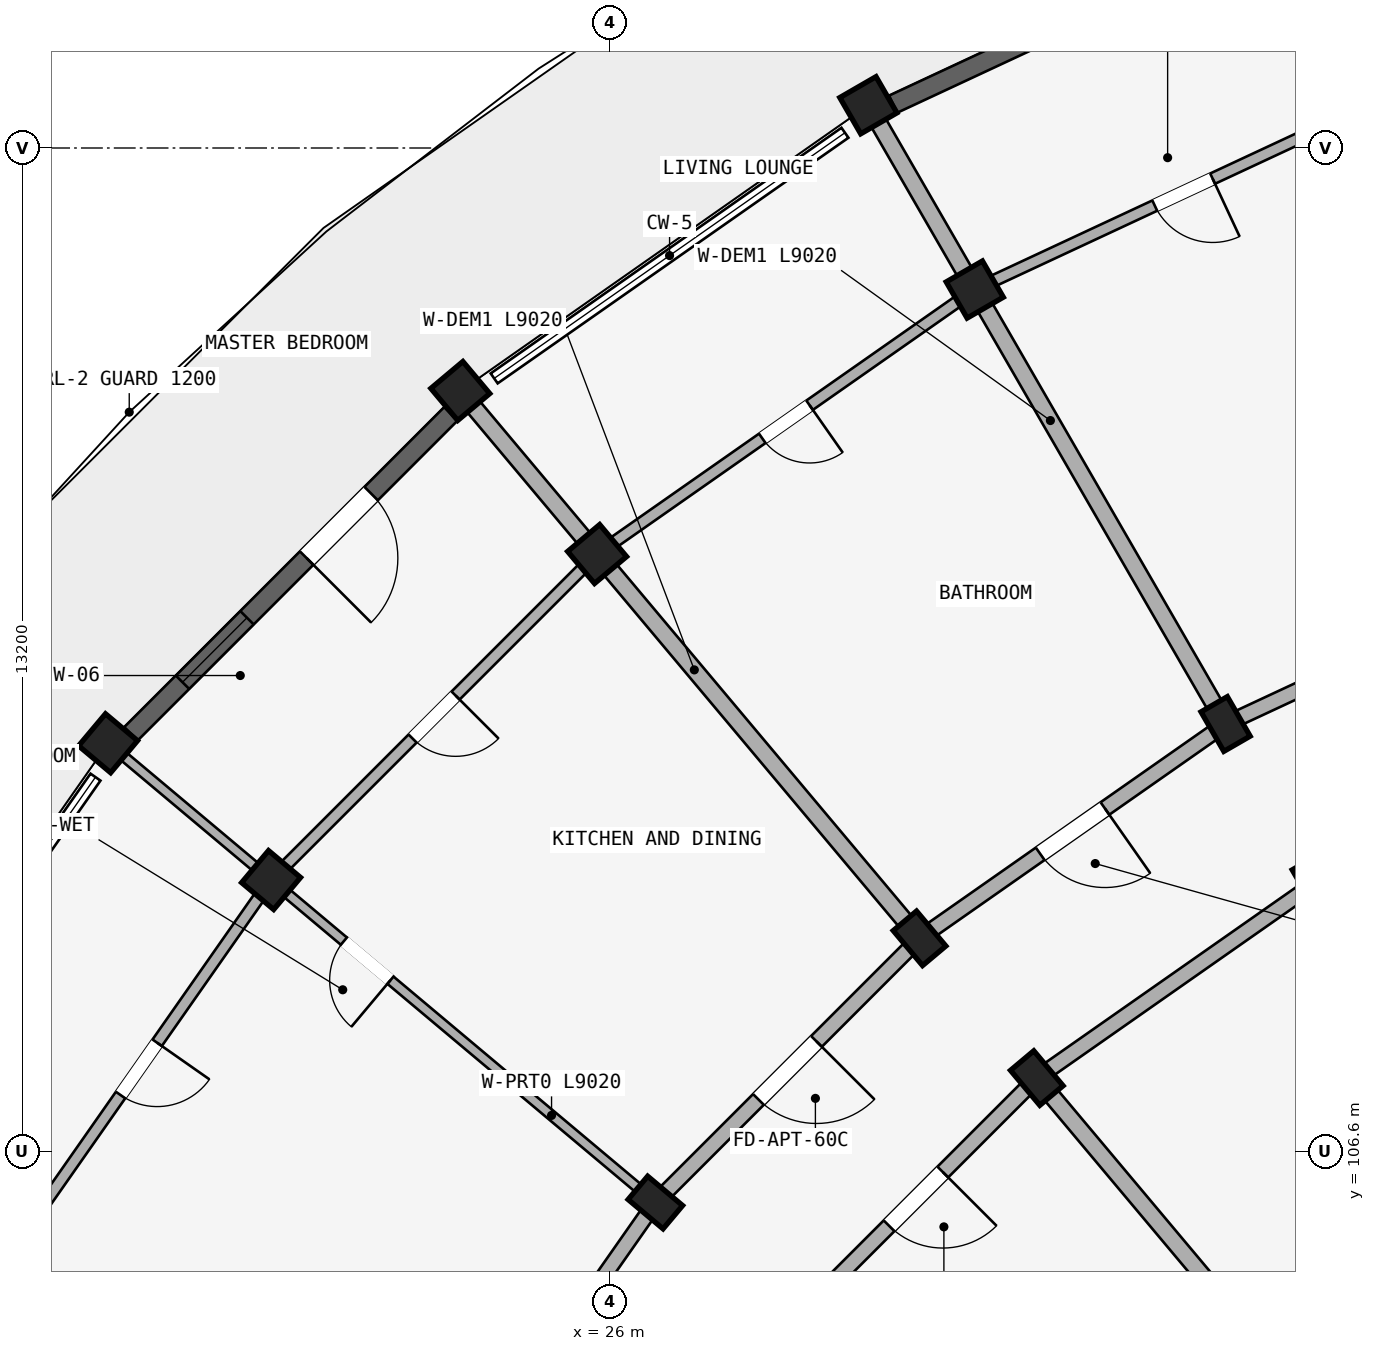
"""IFC4 building model, lengths in metres.
Left out: names, types, materials, properties, quantities, classifications, styles, units other than length and angle.
Written with IfcOpenShell. Run it as: python <this file> out.ifc"""

import sys

from ifc_helpers import new_model, si_unit, direction, frame, frame_2d, origin, origin_2d, place, context, subcontext, project, spatial, rectangle, extrude, element, fill, save


model = new_model("IFC4")
c1 = context("Model", 3, precision=1e-05, world=origin(), true_north=direction((0.0, 1.0)))
c2 = subcontext(c1, "Body", "Model", "MODEL_VIEW")
j1 = project(units=[si_unit("LENGTHUNIT", "METRE"), si_unit("PLANEANGLEUNIT", "RADIAN")], contexts=[c1])
p1 = place(None, origin())
s1 = spatial("IfcSite", under=j1, at=p1, CompositionType="ELEMENT")
p2 = place(p1, origin())
s2 = spatial("IfcBuilding", under=s1, at=p2, CompositionType="ELEMENT")
p3 = place(p2, frame((0.0, 0.0, 46.5)))
s3 = spatial("IfcBuildingStorey", under=s2, at=p3, CompositionType="ELEMENT", Elevation=46.5)
for number, where, z_axis, x_axis in (
    (1, (35.3, 110.144, 0.0), (0.0, 0.0, 1.0), (0.866, 0.5, 0.0)),
    (2, (34.1, 112.222, 0.0), (0.0, 0.0, 1.0), (0.866, 0.5, 0.0)),
):
    element("IfcColumn", number, at=place(p3, frame(where, z_axis=z_axis, x_axis=x_axis)), inside=s3, PredefinedType="COLUMN", context=c2, shape_type="SweptSolid", body=[
        extrude(rectangle(XDim=0.4, YDim=0.6, at=origin_2d()), origin(), (0.0, 0.0, 1.0), 2.93),
    ])
p4 = place(p3, frame((30.8, 117.938, 0.0), z_axis=(0.0, 0.0, 1.0), x_axis=(0.866025403784, 0.5, 0.0)))
e3 = element("IfcColumn", 3, at=p4, inside=s3, PredefinedType="COLUMN", context=c2, shape_type="SweptSolid", body=[
    extrude(rectangle(XDim=0.55, YDim=0.55, at=origin_2d()), origin(), (0.0, 0.0, 1.0), 2.93),
])
p5 = place(p3, frame((29.4, 120.363, 0.0), z_axis=(0.0, 0.0, 1.0), x_axis=(0.866025403784, 0.5, 0.0)))
e4 = element("IfcColumn", 4, at=p5, inside=s3, PredefinedType="COLUMN", context=c2, shape_type="SweptSolid", body=[
    extrude(rectangle(XDim=0.55, YDim=0.55, at=origin_2d()), origin(), (0.0, 0.0, 1.0), 2.97),
])
for number, where, z_axis, x_axis in (
    (5, (31.616, 107.564, 0.0), (0.0, 0.0, 1.0), (0.766, 0.643, 0.0)),
    (6, (30.073, 109.402, 0.0), (0.0, 0.0, 1.0), (0.766, 0.643, 0.0)),
):
    element("IfcColumn", number, at=place(p3, frame(where, z_axis=z_axis, x_axis=x_axis)), inside=s3, PredefinedType="COLUMN", context=c2, shape_type="SweptSolid", body=[
        extrude(rectangle(XDim=0.4, YDim=0.6, at=origin_2d()), origin(), (0.0, 0.0, 1.0), 2.93),
    ])
p6 = place(p3, frame((25.831, 114.458, 0.0), z_axis=(0.0, 0.0, 1.0), x_axis=(0.766044443119, 0.642787609687, 0.0)))
e7 = element("IfcColumn", 7, at=p6, inside=s3, PredefinedType="COLUMN", context=c2, shape_type="SweptSolid", body=[
    extrude(rectangle(XDim=0.55, YDim=0.55, at=origin_2d()), origin(), (0.0, 0.0, 1.0), 2.93),
])
p7 = place(p3, frame((24.031, 116.603, 0.0), z_axis=(0.0, 0.0, 1.0), x_axis=(0.766044443119, 0.642787609687, 0.0)))
e8 = element("IfcColumn", 8, at=p7, inside=s3, PredefinedType="COLUMN", context=c2, shape_type="SweptSolid", body=[
    extrude(rectangle(XDim=0.55, YDim=0.55, at=origin_2d()), origin(), (0.0, 0.0, 1.0), 2.97),
])
p8 = place(p3, frame((26.598, 105.927, 0.0), z_axis=(0.0, 0.0, 1.0), x_axis=(0.642787609687, 0.766044443119, 0.0)))
e9 = element("IfcColumn", 9, at=p8, inside=s3, PredefinedType="COLUMN", context=c2, shape_type="SweptSolid", body=[
    extrude(rectangle(XDim=0.4, YDim=0.6, at=origin_2d()), origin(), (0.0, 0.0, 1.0), 2.93),
])
p9 = place(p3, frame((21.542, 110.169, 0.0), z_axis=(0.0, 0.0, 1.0), x_axis=(0.642787609687, 0.766044443119, 0.0)))
e10 = element("IfcColumn", 10, at=p9, inside=s3, PredefinedType="COLUMN", context=c2, shape_type="SweptSolid", body=[
    extrude(rectangle(XDim=0.55, YDim=0.55, at=origin_2d()), origin(), (0.0, 0.0, 1.0), 2.93),
])
p10 = place(p3, frame((19.397, 111.969, 0.0), z_axis=(0.0, 0.0, 1.0), x_axis=(0.642787609687, 0.766044443119, 0.0)))
e11 = element("IfcColumn", 11, at=p10, inside=s3, PredefinedType="COLUMN", context=c2, shape_type="SweptSolid", body=[
    extrude(rectangle(XDim=0.55, YDim=0.55, at=origin_2d()), origin(), (0.0, 0.0, 1.0), 2.97),
])
p11 = place(p3, frame((38.555, 114.299, 0.0), z_axis=(0.0, 0.0, 1.0), x_axis=(-0.906302381024, -0.422629854778, 0.0)))
e12 = element("IfcWall", 12, at=p11, inside=s3, PredefinedType="STANDARD", context=c2, shape_type="SweptSolid", body=[
    extrude(rectangle(XDim=4.915, YDim=0.2, at=frame_2d((2.458, 0.0))), origin(), (0.0, 0.0, 1.0), 2.372),
])
p12 = place(p3, frame((35.3, 110.144, 0.0), z_axis=(0.0, 0.0, 1.0), x_axis=(-0.819155404658, -0.573571637217, 0.0)))
e13 = element("IfcWall", 13, at=p12, inside=s3, PredefinedType="STANDARD", context=c2, shape_type="SweptSolid", body=[
    extrude(rectangle(XDim=4.497, YDim=0.2, at=frame_2d((2.249, 0.0))), origin(), (0.0, 0.0, 1.0), 2.372),
])
p13 = place(p3, frame((34.1, 112.222, 0.0), z_axis=(0.0, 0.0, 1.0), x_axis=(-0.819140911474, -0.573592335331, 0.0)))
e14 = element("IfcWall", 14, at=p13, inside=s3, PredefinedType="STANDARD", context=c2, shape_type="SweptSolid", body=[
    extrude(rectangle(XDim=4.916, YDim=0.2, at=frame_2d((2.458, 0.0))), origin(), (0.0, 0.0, 1.0), 2.372),
])
p14 = place(p13, frame((1.938, 0.0, 0.0)))
e15 = element("IfcOpeningElement", 15, at=p14, cuts=e14, PredefinedType="OPENING", context=c2, shape_type="SweptSolid", body=[
    extrude(rectangle(XDim=1.04, YDim=2.15, at=frame_2d((0.52, 1.075))), frame((0.0, 0.11, 0.0), z_axis=(0.0, -1.0, 0.0), x_axis=(1.0, 0.0, 0.0)), (0.0, 0.0, 1.0), 0.22),
])
p15 = place(p3, frame((31.616, 107.564, 0.0), z_axis=(0.0, 0.0, 1.0), x_axis=(-0.707106781187, -0.707106781187, 0.0)))
e16 = element("IfcWall", 16, at=p15, inside=s3, PredefinedType="STANDARD", context=c2, shape_type="SweptSolid", body=[
    extrude(rectangle(XDim=4.497, YDim=0.2, at=frame_2d((2.249, 0.0))), origin(), (0.0, 0.0, 1.0), 2.372),
])
p16 = place(p15, frame((1.749, 0.0, 0.0)))
e17 = element("IfcOpeningElement", 17, at=p16, cuts=e16, PredefinedType="OPENING", context=c2, shape_type="SweptSolid", body=[
    extrude(rectangle(XDim=1.0, YDim=2.15, at=frame_2d((0.5, 1.075))), frame((0.0, 0.11, 0.0), z_axis=(0.0, -1.0, 0.0), x_axis=(1.0, 0.0, 0.0)), (0.0, 0.0, 1.0), 0.22),
])
p17 = place(p3, frame((30.073, 109.402, 0.0), z_axis=(0.0, 0.0, 1.0), x_axis=(-0.707106781187, -0.707106781187, 0.0)))
e18 = element("IfcWall", 18, at=p17, inside=s3, PredefinedType="STANDARD", context=c2, shape_type="SweptSolid", body=[
    extrude(rectangle(XDim=4.916, YDim=0.2, at=frame_2d((2.458, 0.0))), origin(), (0.0, 0.0, 1.0), 2.372),
])
p18 = place(p17, frame((1.918, 0.0, 0.0)))
e19 = element("IfcOpeningElement", 19, at=p18, cuts=e18, PredefinedType="OPENING", context=c2, shape_type="SweptSolid", body=[
    extrude(rectangle(XDim=1.08, YDim=2.15, at=frame_2d((0.54, 1.075))), frame((0.0, 0.11, 0.0), z_axis=(0.0, -1.0, 0.0), x_axis=(1.0, 0.0, 0.0)), (0.0, 0.0, 1.0), 0.22),
])
p19 = place(p3, frame((26.598, 105.927, 0.0), z_axis=(0.0, 0.0, 1.0), x_axis=(-0.573592335331, -0.819140911474, 0.0)))
e20 = element("IfcWall", 20, at=p19, inside=s3, PredefinedType="STANDARD", context=c2, shape_type="SweptSolid", body=[
    extrude(rectangle(XDim=4.916, YDim=0.2, at=frame_2d((2.458, 0.0))), origin(), (0.0, 0.0, 1.0), 2.372),
])
p20 = place(p3, frame((34.05, 112.309, 0.0), z_axis=(0.0, 0.0, 1.0), x_axis=(-0.500002045973, 0.866024222538, 0.0)))
e21 = element("IfcWall", 21, at=p20, inside=s3, PredefinedType="STANDARD", context=c2, shape_type="SweptSolid", body=[
    extrude(rectangle(XDim=9.02, YDim=0.22, at=frame_2d((4.51, 0.0))), origin(), (0.0, 0.0, 1.0), 2.372),
])
p21 = place(p3, frame((35.987, 102.355, 0.0), z_axis=(0.0, 0.0, 1.0), x_axis=(-0.642784846501, 0.766046761698, 0.0)))
e22 = element("IfcWall", 22, at=p21, inside=s3, PredefinedType="STANDARD", context=c2, shape_type="SweptSolid", body=[
    extrude(rectangle(XDim=6.75, YDim=0.22, at=frame_2d((3.375, 0.0))), origin(), (0.0, 0.0, 1.0), 2.372),
])
p22 = place(p3, frame((30.009, 109.479, 0.0), z_axis=(0.0, 0.0, 1.0), x_axis=(-0.642784468535, 0.766047078847, 0.0)))
e23 = element("IfcWall", 23, at=p22, inside=s3, PredefinedType="STANDARD", context=c2, shape_type="SweptSolid", body=[
    extrude(rectangle(XDim=9.02, YDim=0.22, at=frame_2d((4.51, 0.0))), origin(), (0.0, 0.0, 1.0), 2.372),
])
p23 = place(p3, frame((26.521, 105.991, 0.0), z_axis=(0.0, 0.0, 1.0), x_axis=(-0.766047078847, 0.642784468535, 0.0)))
e24 = element("IfcWall", 24, at=p23, inside=s3, PredefinedType="PARTITIONING", context=c2, shape_type="SweptSolid", body=[
    extrude(rectangle(XDim=9.02, YDim=0.125, at=frame_2d((4.51, 0.0))), origin(), (0.0, 0.0, 1.0), 2.372),
])
p24 = place(p23, frame((4.45, 0.0, 0.0)))
e25 = element("IfcOpeningElement", 25, at=p24, cuts=e24, PredefinedType="OPENING", context=c2, shape_type="SweptSolid", body=[
    extrude(rectangle(XDim=0.8, YDim=2.1, at=frame_2d((0.4, 1.05))), frame((0.0, 0.073, 0.0), z_axis=(0.0, -1.0, 0.0), x_axis=(1.0, 0.0, 0.0)), (0.0, 0.0, 1.0), 0.145),
])
p25 = place(p3, frame((23.691, 101.95, 0.0), z_axis=(0.0, 0.0, 1.0), x_axis=(-0.866024222538, 0.500002045973, 0.0)))
e26 = element("IfcWall", 26, at=p25, inside=s3, PredefinedType="STANDARD", context=c2, shape_type="SweptSolid", body=[
    extrude(rectangle(XDim=9.02, YDim=0.22, at=frame_2d((4.51, 0.0))), origin(), (0.0, 0.0, 1.0), 2.372),
])
p26 = place(p3, frame((36.298, 120.501, 0.0), z_axis=(0.0, 0.0, 1.0), x_axis=(-0.906312656069, -0.42260781991, 0.0)))
e27 = element("IfcWall", 27, at=p26, inside=s3, PredefinedType="PLUMBINGWALL", context=c2, shape_type="SweptSolid", body=[
    extrude(rectangle(XDim=6.066, YDim=0.15, at=frame_2d((3.033, 0.0))), origin(), (0.0, 0.0, 1.0), 2.372),
])
p27 = place(p26, frame((2.613, 0.0, 0.0)))
e28 = element("IfcOpeningElement", 28, at=p27, cuts=e27, PredefinedType="OPENING", context=c2, shape_type="SweptSolid", body=[
    extrude(rectangle(XDim=0.84, YDim=2.1, at=frame_2d((0.42, 1.05))), frame((0.0, 0.085, 0.0), z_axis=(0.0, -1.0, 0.0), x_axis=(1.0, 0.0, 0.0)), (0.0, 0.0, 1.0), 0.17),
])
p28 = place(p3, frame((30.8, 117.938, 0.0), z_axis=(0.0, 0.0, 1.0), x_axis=(-0.81913926159, -0.573594691504, 0.0)))
e29 = element("IfcWall", 29, at=p28, inside=s3, PredefinedType="PLUMBINGWALL", context=c2, shape_type="SweptSolid", body=[
    extrude(rectangle(XDim=6.066, YDim=0.15, at=frame_2d((3.033, 0.0))), origin(), (0.0, 0.0, 1.0), 2.372),
])
p29 = place(p28, frame((2.653, 0.0, 0.0)))
e30 = element("IfcOpeningElement", 30, at=p29, cuts=e29, PredefinedType="OPENING", context=c2, shape_type="SweptSolid", body=[
    extrude(rectangle(XDim=0.76, YDim=2.05, at=frame_2d((0.38, 1.025))), frame((0.0, 0.085, 0.0), z_axis=(0.0, -1.0, 0.0), x_axis=(1.0, 0.0, 0.0)), (0.0, 0.0, 1.0), 0.17),
])
p30 = place(p3, frame((25.831, 114.458, 0.0), z_axis=(0.0, 0.0, 1.0), x_axis=(-0.707106781187, -0.707106781187, 0.0)))
e31 = element("IfcWall", 31, at=p30, inside=s3, PredefinedType="PLUMBINGWALL", context=c2, shape_type="SweptSolid", body=[
    extrude(rectangle(XDim=6.066, YDim=0.15, at=frame_2d((3.033, 0.0))), origin(), (0.0, 0.0, 1.0), 2.372),
])
p31 = place(p30, frame((2.633, 0.0, 0.0)))
e32 = element("IfcOpeningElement", 32, at=p31, cuts=e31, PredefinedType="OPENING", context=c2, shape_type="SweptSolid", body=[
    extrude(rectangle(XDim=0.8, YDim=2.1, at=frame_2d((0.4, 1.05))), frame((0.0, 0.085, 0.0), z_axis=(0.0, -1.0, 0.0), x_axis=(1.0, 0.0, 0.0)), (0.0, 0.0, 1.0), 0.17),
])
p32 = place(p3, frame((21.542, 110.169, 0.0), z_axis=(0.0, 0.0, 1.0), x_axis=(-0.573594691504, -0.81913926159, 0.0)))
e33 = element("IfcWall", 33, at=p32, inside=s3, PredefinedType="PLUMBINGWALL", context=c2, shape_type="SweptSolid", body=[
    extrude(rectangle(XDim=6.066, YDim=0.15, at=frame_2d((3.033, 0.0))), origin(), (0.0, 0.0, 1.0), 2.372),
])
p33 = place(p32, frame((2.613, 0.0, 0.0)))
e34 = element("IfcOpeningElement", 34, at=p33, cuts=e33, PredefinedType="OPENING", context=c2, shape_type="SweptSolid", body=[
    extrude(rectangle(XDim=0.84, YDim=2.1, at=frame_2d((0.42, 1.05))), frame((0.0, 0.085, 0.0), z_axis=(0.0, -1.0, 0.0), x_axis=(1.0, 0.0, 0.0)), (0.0, 0.0, 1.0), 0.17),
])
p34 = place(p3, frame((35.12, 122.892, 0.0), z_axis=(0.0, 0.0, 1.0), x_axis=(-0.90629940826, -0.422636229619, 0.0)))
e35 = element("IfcWall", 35, at=p34, inside=s3, PredefinedType="STANDARD", context=c2, shape_type="SweptSolid", body=[
    extrude(rectangle(XDim=5.953, YDim=0.25, at=frame_2d((2.977, 0.0))), origin(), (0.0, 0.0, 1.0), 2.48),
])
p35 = place(p34, frame((2.027, 0.0, 0.53)))
e36 = element("IfcOpeningElement", 36, at=p35, cuts=e35, PredefinedType="OPENING", context=c2, shape_type="SweptSolid", body=[
    extrude(rectangle(XDim=1.9, YDim=1.75, at=frame_2d((0.95, 0.875))), frame((0.0, 0.135, 0.0), z_axis=(0.0, -1.0, 0.0), x_axis=(1.0, 0.0, 0.0)), (0.0, 0.0, 1.0), 0.27),
])
p36 = place(p3, frame((23.907, 116.302, 0.0), z_axis=(0.0, 0.0, 1.0), x_axis=(-0.707106781187, -0.707106781187, 0.0)))
e37 = element("IfcWall", 37, at=p36, inside=s3, PredefinedType="STANDARD", context=c2, shape_type="SweptSolid", body=[
    extrude(rectangle(XDim=5.953, YDim=0.25, at=frame_2d((2.976, 0.0))), origin(), (0.0, 0.0, 1.0), 2.48),
])
p37 = place(p36, frame((3.793, 0.0, 0.38)))
e38 = element("IfcOpeningElement", 38, at=p37, cuts=e37, PredefinedType="OPENING", context=c2, shape_type="SweptSolid", body=[
    extrude(rectangle(XDim=1.2, YDim=1.5, at=frame_2d((0.6, 0.75))), frame((0.0, 0.135, 0.0), z_axis=(0.0, -1.0, 0.0), x_axis=(1.0, 0.0, 0.0)), (0.0, 0.0, 1.0), 0.27),
])
p38 = place(p36, frame((1.484, 0.0, 0.0)))
e39 = element("IfcOpeningElement", 39, at=p38, cuts=e37, PredefinedType="OPENING", context=c2, shape_type="SweptSolid", body=[
    extrude(rectangle(XDim=1.2, YDim=2.15, at=frame_2d((0.6, 1.075))), frame((0.0, 0.135, 0.0), z_axis=(0.0, -1.0, 0.0), x_axis=(1.0, 0.0, 0.0)), (0.0, 0.0, 1.0), 0.27),
])
p39 = place(p37, origin())
e40 = element("IfcWindow", 40, at=p39, inside=s3, PartitioningType="SINGLE_PANEL", PredefinedType="WINDOW", context=c2, shape_type="SweptSolid", body=[
    extrude(rectangle(XDim=1.2, YDim=1.5, at=frame_2d((0.6, 0.75))), frame((0.0, 0.03, 0.0), z_axis=(0.0, -1.0, 0.0), x_axis=(1.0, 0.0, 0.0)), (0.0, 0.0, 1.0), 0.06),
])
fill(e38, e40)
p40 = place(p24, frame((0.8, 0.0, 0.0), z_axis=(0.0, 0.0, 1.0), x_axis=(-1.0, 0.0, 0.0)))
e41 = element("IfcDoor", 41, at=p40, inside=s3, OperationType="SINGLE_SWING_RIGHT", PredefinedType="DOOR", context=c2, shape_type="SweptSolid", body=[
    extrude(rectangle(XDim=0.8, YDim=2.1, at=frame_2d((0.4, 1.05))), frame((0.0, 0.025, 0.0), z_axis=(0.0, -1.0, 0.0), x_axis=(1.0, 0.0, 0.0)), (0.0, 0.0, 1.0), 0.05),
])
fill(e25, e41)
p41 = place(p27, origin())
e42 = element("IfcDoor", 42, at=p41, inside=s3, OperationType="SINGLE_SWING_LEFT", PredefinedType="DOOR", context=c2, shape_type="SweptSolid", body=[
    extrude(rectangle(XDim=0.84, YDim=2.1, at=frame_2d((0.42, 1.05))), frame((0.0, 0.025, 0.0), z_axis=(0.0, -1.0, 0.0), x_axis=(1.0, 0.0, 0.0)), (0.0, 0.0, 1.0), 0.05),
])
fill(e28, e42)
p42 = place(p14, frame((1.04, 0.0, 0.0), z_axis=(0.0, 0.0, 1.0), x_axis=(-1.0, 0.0, 0.0)))
e43 = element("IfcDoor", 43, at=p42, inside=s3, OperationType="SINGLE_SWING_RIGHT", PredefinedType="DOOR", context=c2, shape_type="SweptSolid", body=[
    extrude(rectangle(XDim=1.04, YDim=2.15, at=frame_2d((0.52, 1.075))), frame((0.0, 0.025, 0.0), z_axis=(0.0, -1.0, 0.0), x_axis=(1.0, 0.0, 0.0)), (0.0, 0.0, 1.0), 0.05),
])
fill(e15, e43)
p43 = place(p29, origin())
e44 = element("IfcDoor", 44, at=p43, inside=s3, OperationType="SINGLE_SWING_LEFT", PredefinedType="DOOR", context=c2, shape_type="SweptSolid", body=[
    extrude(rectangle(XDim=0.76, YDim=2.05, at=frame_2d((0.38, 1.025))), frame((0.0, 0.025, 0.0), z_axis=(0.0, -1.0, 0.0), x_axis=(1.0, 0.0, 0.0)), (0.0, 0.0, 1.0), 0.05),
])
fill(e30, e44)
p44 = place(p18, frame((1.08, 0.0, 0.0), z_axis=(0.0, 0.0, 1.0), x_axis=(-1.0, 0.0, 0.0)))
e45 = element("IfcDoor", 45, at=p44, inside=s3, OperationType="SINGLE_SWING_RIGHT", PredefinedType="DOOR", context=c2, shape_type="SweptSolid", body=[
    extrude(rectangle(XDim=1.08, YDim=2.15, at=frame_2d((0.54, 1.075))), frame((0.0, 0.025, 0.0), z_axis=(0.0, -1.0, 0.0), x_axis=(1.0, 0.0, 0.0)), (0.0, 0.0, 1.0), 0.05),
])
fill(e19, e45)
p45 = place(p31, origin())
e46 = element("IfcDoor", 46, at=p45, inside=s3, OperationType="SINGLE_SWING_LEFT", PredefinedType="DOOR", context=c2, shape_type="SweptSolid", body=[
    extrude(rectangle(XDim=0.8, YDim=2.1, at=frame_2d((0.4, 1.05))), frame((0.0, 0.025, 0.0), z_axis=(0.0, -1.0, 0.0), x_axis=(1.0, 0.0, 0.0)), (0.0, 0.0, 1.0), 0.05),
])
fill(e32, e46)
p46 = place(p33, frame((0.84, 0.0, 0.0), z_axis=(0.0, 0.0, 1.0), x_axis=(-1.0, 0.0, 0.0)))
e47 = element("IfcDoor", 47, at=p46, inside=s3, OperationType="SINGLE_SWING_RIGHT", PredefinedType="DOOR", context=c2, shape_type="SweptSolid", body=[
    extrude(rectangle(XDim=0.84, YDim=2.1, at=frame_2d((0.42, 1.05))), frame((0.0, 0.025, 0.0), z_axis=(0.0, -1.0, 0.0), x_axis=(1.0, 0.0, 0.0)), (0.0, 0.0, 1.0), 0.05),
])
fill(e34, e47)
p47 = place(p16, frame((1.0, 0.0, 0.0), z_axis=(0.0, 0.0, 1.0), x_axis=(-1.0, 0.0, 0.0)))
e48 = element("IfcDoor", 48, at=p47, inside=s3, OperationType="SINGLE_SWING_RIGHT", PredefinedType="DOOR", context=c2, shape_type="SweptSolid", body=[
    extrude(rectangle(XDim=1.0, YDim=2.15, at=frame_2d((0.5, 1.075))), frame((0.0, 0.025, 0.0), z_axis=(0.0, -1.0, 0.0), x_axis=(1.0, 0.0, 0.0)), (0.0, 0.0, 1.0), 0.05),
])
fill(e17, e48)
p48 = place(p38, frame((1.2, 0.0, 0.0), z_axis=(0.0, 0.0, 1.0), x_axis=(-1.0, 0.0, 0.0)))
e49 = element("IfcDoor", 49, at=p48, inside=s3, OperationType="SINGLE_SWING_LEFT", PredefinedType="DOOR", context=c2, shape_type="SweptSolid", body=[
    extrude(rectangle(XDim=1.2, YDim=2.15, at=frame_2d((0.6, 1.075))), frame((0.0, 0.025, 0.0), z_axis=(0.0, -1.0, 0.0), x_axis=(1.0, 0.0, 0.0)), (0.0, 0.0, 1.0), 0.05),
])
fill(e39, e49)
save(model, sys.argv[1])
